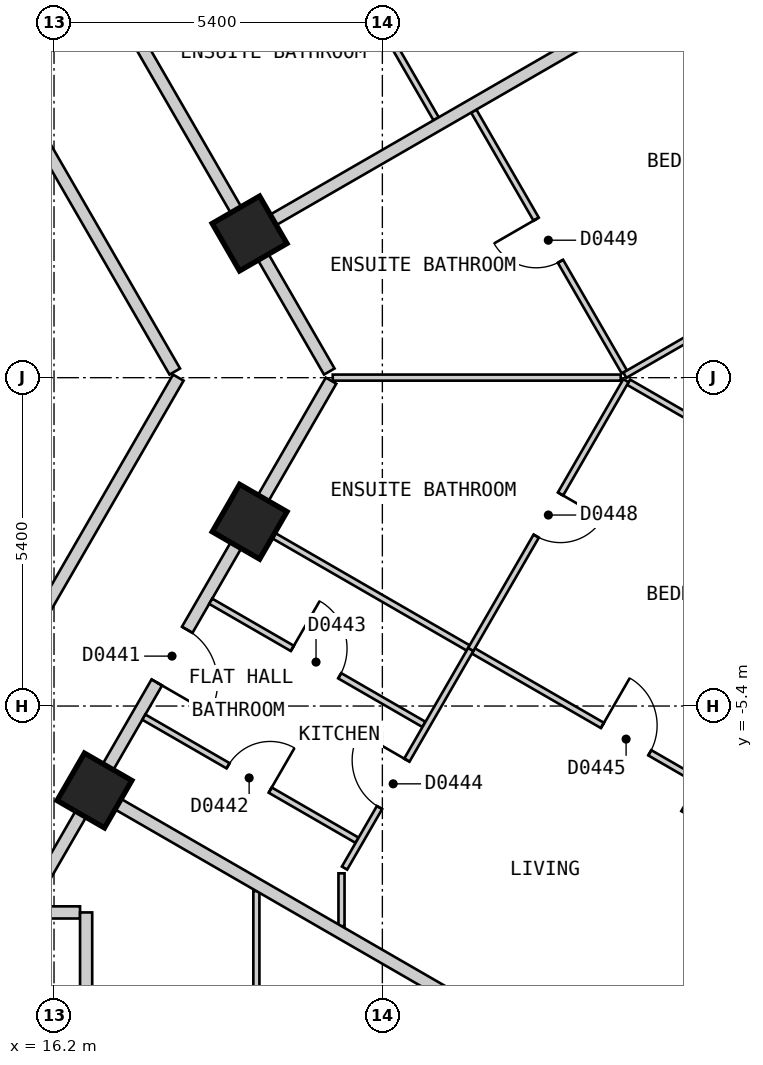
"""IFC4 building model, lengths in metres.
Left out: names, types, materials, properties, quantities, classifications, styles, units other than length and angle.
Written with IfcOpenShell. Run it as: python <this file> out.ifc"""

import sys

from ifc_helpers import new_model, si_unit, direction, frame, frame_2d, origin, origin_2d, place, context, subcontext, project, spatial, polyline, rectangle, outline, extrude, element, fill, save


model = new_model("IFC4")
c1 = context("Model", 3, precision=1e-05, world=origin(), true_north=direction((0.0, 1.0)))
c2 = subcontext(c1, "Body", "Model", "MODEL_VIEW")
j1 = project(units=[si_unit("LENGTHUNIT", "METRE"), si_unit("PLANEANGLEUNIT", "RADIAN")], contexts=[c1])
p1 = place(None, origin())
s1 = spatial("IfcSite", under=j1, at=p1, CompositionType="ELEMENT")
p2 = place(p1, origin())
s2 = spatial("IfcBuilding", under=s1, at=p2, CompositionType="ELEMENT")
p3 = place(p2, frame((0.0, 0.0, 38.4)))
s3 = spatial("IfcBuildingStorey", under=s2, at=p3, CompositionType="ELEMENT", Elevation=38.4)
p4 = place(p3, frame((27.298, -6.919, 0.0), z_axis=(0.0, 0.0, 1.0), x_axis=(0.499984884929, 0.866034130299, 0.0)))
e1 = element("IfcColumn", 1, at=p4, inside=s3, PredefinedType="COLUMN", context=c2, shape_type="SweptSolid", body=[
    extrude(rectangle(XDim=1.1, YDim=1.1, at=origin_2d()), origin(), (0.0, 0.0, 1.0), 3.0),
])
for number, where, z_axis, x_axis in (
    (2, (16.865, -6.789, 0.0), (0.0, 0.0, 1.0), (0.5, 0.866, 0.0)),
    (3, (19.417, -2.369, 0.0), (0.0, 0.0, 1.0), (0.5, 0.866, 0.0)),
    (4, (19.416, 2.371, 0.0), (0.0, 0.0, 1.0), (-0.5, 0.866, 0.0)),
):
    element("IfcColumn", number, at=place(p3, frame(where, z_axis=z_axis, x_axis=x_axis)), inside=s3, PredefinedType="COLUMN", context=c2, shape_type="SweptSolid", body=[
        extrude(rectangle(XDim=0.9, YDim=0.9, at=origin_2d()), origin(), (0.0, 0.0, 1.0), 3.0),
    ])
p5 = place(p3, frame((17.71, -25.825, 0.0), z_axis=(0.0, 0.0, 1.0), x_axis=(0.500001938803, 0.866024284413, 0.0)))
e5 = element("IfcWall", 5, at=p5, inside=s3, PredefinedType="SOLIDWALL", context=c2, shape_type="SweptSolid", body=[
    extrude(outline(polyline([(0.0, -0.15), (27.02, -0.15), (26.94, 0.15), (0.08, 0.15), (0.0, -0.15)])), origin(), (0.0, 0.0, 1.0), 2.7),
])
p6 = place(p5, frame((2.553, 0.0, 0.15)))
e6 = element("IfcOpeningElement", 6, at=p6, cuts=e5, PredefinedType="OPENING", context=c2, shape_type="SweptSolid", body=[
    extrude(rectangle(XDim=1.5, YDim=2.1, at=frame_2d((0.75, 1.05))), frame((0.0, 0.16, 0.0), z_axis=(0.0, -1.0, 0.0), x_axis=(1.0, 0.0, 0.0)), (0.0, 0.0, 1.0), 0.32),
])
p7 = place(p5, frame((7.658, 0.0, 0.15)))
e7 = element("IfcOpeningElement", 7, at=p7, cuts=e5, PredefinedType="OPENING", context=c2, shape_type="SweptSolid", body=[
    extrude(rectangle(XDim=1.5, YDim=2.1, at=frame_2d((0.75, 1.05))), frame((0.0, 0.16, 0.0), z_axis=(0.0, -1.0, 0.0), x_axis=(1.0, 0.0, 0.0)), (0.0, 0.0, 1.0), 0.32),
])
p8 = place(p5, frame((12.761, 0.0, 0.15)))
e8 = element("IfcOpeningElement", 8, at=p8, cuts=e5, PredefinedType="OPENING", context=c2, shape_type="SweptSolid", body=[
    extrude(rectangle(XDim=1.5, YDim=2.1, at=frame_2d((0.75, 1.05))), frame((0.0, 0.16, 0.0), z_axis=(0.0, -1.0, 0.0), x_axis=(1.0, 0.0, 0.0)), (0.0, 0.0, 1.0), 0.32),
])
p9 = place(p5, frame((17.865, 0.0, 0.15)))
e9 = element("IfcOpeningElement", 9, at=p9, cuts=e5, PredefinedType="OPENING", context=c2, shape_type="SweptSolid", body=[
    extrude(rectangle(XDim=1.5, YDim=2.1, at=frame_2d((0.75, 1.05))), frame((0.0, 0.16, 0.0), z_axis=(0.0, -1.0, 0.0), x_axis=(1.0, 0.0, 0.0)), (0.0, 0.0, 1.0), 0.32),
])
p10 = place(p5, frame((22.969, 0.0, 0.15)))
e10 = element("IfcOpeningElement", 10, at=p10, cuts=e5, PredefinedType="OPENING", context=c2, shape_type="SweptSolid", body=[
    extrude(rectangle(XDim=1.5, YDim=2.1, at=frame_2d((0.75, 1.05))), frame((0.0, 0.16, 0.0), z_axis=(0.0, -1.0, 0.0), x_axis=(1.0, 0.0, 0.0)), (0.0, 0.0, 1.0), 0.32),
])
p11 = place(p3, frame((31.22, 2.425, 0.0), z_axis=(0.0, 0.0, 1.0), x_axis=(-0.500001938803, 0.866024284413, 0.0)))
e11 = element("IfcWall", 11, at=p11, inside=s3, PredefinedType="SOLIDWALL", context=c2, shape_type="SweptSolid", body=[
    extrude(outline(polyline([(0.0, -0.15), (27.02, -0.15), (26.94, 0.15), (0.08, 0.15), (0.0, -0.15)])), origin(), (0.0, 0.0, 1.0), 2.7),
])
p12 = place(p11, frame((2.553, 0.0, 0.15)))
e12 = element("IfcOpeningElement", 12, at=p12, cuts=e11, PredefinedType="OPENING", context=c2, shape_type="SweptSolid", body=[
    extrude(rectangle(XDim=1.5, YDim=2.1, at=frame_2d((0.75, 1.05))), frame((0.0, 0.16, 0.0), z_axis=(0.0, -1.0, 0.0), x_axis=(1.0, 0.0, 0.0)), (0.0, 0.0, 1.0), 0.32),
])
p13 = place(p11, frame((7.657, 0.0, 0.15)))
e13 = element("IfcOpeningElement", 13, at=p13, cuts=e11, PredefinedType="OPENING", context=c2, shape_type="SweptSolid", body=[
    extrude(rectangle(XDim=1.5, YDim=2.1, at=frame_2d((0.75, 1.05))), frame((0.0, 0.16, 0.0), z_axis=(0.0, -1.0, 0.0), x_axis=(1.0, 0.0, 0.0)), (0.0, 0.0, 1.0), 0.32),
])
p14 = place(p11, frame((12.761, 0.0, 0.15)))
e14 = element("IfcOpeningElement", 14, at=p14, cuts=e11, PredefinedType="OPENING", context=c2, shape_type="SweptSolid", body=[
    extrude(rectangle(XDim=1.5, YDim=2.1, at=frame_2d((0.75, 1.05))), frame((0.0, 0.16, 0.0), z_axis=(0.0, -1.0, 0.0), x_axis=(1.0, 0.0, 0.0)), (0.0, 0.0, 1.0), 0.32),
])
p15 = place(p11, frame((17.865, 0.0, 0.15)))
e15 = element("IfcOpeningElement", 15, at=p15, cuts=e11, PredefinedType="OPENING", context=c2, shape_type="SweptSolid", body=[
    extrude(rectangle(XDim=1.5, YDim=2.1, at=frame_2d((0.75, 1.05))), frame((0.0, 0.16, 0.0), z_axis=(0.0, -1.0, 0.0), x_axis=(1.0, 0.0, 0.0)), (0.0, 0.0, 1.0), 0.32),
])
p16 = place(p11, frame((22.969, 0.0, 0.15)))
e16 = element("IfcOpeningElement", 16, at=p16, cuts=e11, PredefinedType="OPENING", context=c2, shape_type="SweptSolid", body=[
    extrude(rectangle(XDim=1.5, YDim=2.1, at=frame_2d((0.75, 1.05))), frame((0.0, 0.16, 0.0), z_axis=(0.0, -1.0, 0.0), x_axis=(1.0, 0.0, 0.0)), (0.0, 0.0, 1.0), 0.32),
])
p17 = place(p3, frame((9.18, 15.7, 0.0), z_axis=(0.0, 0.0, 1.0), x_axis=(0.500003652032, -0.866023295272, 0.0)))
e17 = element("IfcWall", 17, at=p17, inside=s3, PredefinedType="PARTITIONING", context=c2, shape_type="SweptSolid", body=[
    extrude(rectangle(XDim=18.012, YDim=0.2, at=frame_2d((9.006, 0.0))), origin(), (0.0, 0.0, 1.0), 2.7),
])
p18 = place(p17, frame((8.556, 0.0, 0.0)))
e18 = element("IfcOpeningElement", 18, at=p18, cuts=e17, PredefinedType="OPENING", context=c2, shape_type="SweptSolid", body=[
    extrude(rectangle(XDim=0.9, YDim=2.1, at=frame_2d((0.45, 1.05))), frame((0.0, 0.11, 0.0), z_axis=(0.0, -1.0, 0.0), x_axis=(1.0, 0.0, 0.0)), (0.0, 0.0, 1.0), 0.22),
])
p19 = place(p3, frame((10.45, 17.9, 0.0), z_axis=(0.0, 0.0, 1.0), x_axis=(0.500034352617, -0.866005569383, 0.0)))
e19 = element("IfcWall", 19, at=p19, inside=s3, PredefinedType="PARTITIONING", context=c2, shape_type="SweptSolid", body=[
    extrude(rectangle(XDim=20.553, YDim=0.2, at=frame_2d((10.276, 0.0))), origin(), (0.0, 0.0, 1.0), 2.7),
])
p20 = place(p19, frame((9.775, 0.0, 0.0)))
e20 = element("IfcOpeningElement", 20, at=p20, cuts=e19, PredefinedType="OPENING", context=c2, shape_type="SweptSolid", body=[
    extrude(rectangle(XDim=1.0, YDim=2.1, at=frame_2d((0.5, 1.05))), frame((0.0, 0.11, 0.0), z_axis=(0.0, -1.0, 0.0), x_axis=(1.0, 0.0, 0.0)), (0.0, 0.0, 1.0), 0.22),
])
p21 = place(p19, frame((0.852, 0.0, 0.0)))
e21 = element("IfcOpeningElement", 21, at=p21, cuts=e19, PredefinedType="OPENING", context=c2, shape_type="SweptSolid", body=[
    extrude(rectangle(XDim=0.8, YDim=2.1, at=frame_2d((0.4, 1.05))), frame((0.0, 0.11, 0.0), z_axis=(0.0, -1.0, 0.0), x_axis=(1.0, 0.0, 0.0)), (0.0, 0.0, 1.0), 0.22),
])
p22 = place(p3, frame((15.822, -8.794, 0.0), z_axis=(0.0, 0.0, 1.0), x_axis=(1.0, 0.0, 0.0)))
e22 = element("IfcWall", 22, at=p22, inside=s3, PredefinedType="PARTITIONING", context=c2, shape_type="SweptSolid", body=[
    extrude(rectangle(XDim=0.806, YDim=0.2, at=frame_2d((0.403, 0.0))), origin(), (0.0, 0.0, 1.0), 2.7),
])
p23 = place(p3, frame((15.6, -4.579, 0.0), z_axis=(0.0, 0.0, 1.0), x_axis=(0.499927597274, 0.866067201483, 0.0)))
e23 = element("IfcWall", 23, at=p23, inside=s3, PredefinedType="PARTITIONING", context=c2, shape_type="SweptSolid", body=[
    extrude(rectangle(XDim=5.288, YDim=0.2, at=frame_2d((2.644, 0.0))), origin(), (0.0, 0.0, 1.0), 2.7),
])
p24 = place(p3, frame((15.707, -8.794, 0.0), z_axis=(0.0, 0.0, 1.0), x_axis=(0.500016151272, 0.866016078642, 0.0)))
e24 = element("IfcWall", 24, at=p24, inside=s3, PredefinedType="PARTITIONING", context=c2, shape_type="SweptSolid", body=[
    extrude(rectangle(XDim=10.098, YDim=0.2, at=frame_2d((5.049, 0.0))), origin(), (0.0, 0.0, 1.0), 2.7),
])
p25 = place(p24, frame((4.367, 0.0, 0.0)))
e25 = element("IfcOpeningElement", 25, at=p25, cuts=e24, PredefinedType="OPENING", context=c2, shape_type="SweptSolid", body=[
    extrude(rectangle(XDim=1.0, YDim=2.1, at=frame_2d((0.5, 1.05))), frame((0.0, 0.11, 0.0), z_axis=(0.0, -1.0, 0.0), x_axis=(1.0, 0.0, 0.0)), (0.0, 0.0, 1.0), 0.22),
])
p26 = place(p3, frame((16.728, -13.624, 0.0), z_axis=(0.0, 0.0, 1.0), x_axis=(0.0, 1.0, 0.0)))
e26 = element("IfcWall", 26, at=p26, inside=s3, PredefinedType="PARTITIONING", context=c2, shape_type="SweptSolid", body=[
    extrude(rectangle(XDim=4.83, YDim=0.2, at=frame_2d((2.415, 0.0))), origin(), (0.0, 0.0, 1.0), 2.7),
])
p27 = place(p3, frame((20.006, 8.548, 0.0), z_axis=(0.0, 0.0, 1.0), x_axis=(0.500055121407, -0.865993577086, 0.0)))
e27 = element("IfcWall", 27, at=p27, inside=s3, PredefinedType="PARTITIONING", context=c2, shape_type="SweptSolid", body=[
    extrude(rectangle(XDim=4.955, YDim=0.1, at=frame_2d((2.478, 0.0))), origin(), (0.0, 0.0, 1.0), 2.7),
])
p28 = place(p27, frame((2.102, 0.0, 0.0)))
e28 = element("IfcOpeningElement", 28, at=p28, cuts=e27, PredefinedType="OPENING", context=c2, shape_type="SweptSolid", body=[
    extrude(rectangle(XDim=0.8, YDim=2.1, at=frame_2d((0.4, 1.05))), frame((0.0, 0.06, 0.0), z_axis=(0.0, -1.0, 0.0), x_axis=(1.0, 0.0, 0.0)), (0.0, 0.0, 1.0), 0.12),
])
p29 = place(p3, frame((23.103, 4.384, 0.0), z_axis=(0.0, 0.0, 1.0), x_axis=(0.500029609304, -0.86600830817, 0.0)))
e29 = element("IfcWall", 29, at=p29, inside=s3, PredefinedType="PARTITIONING", context=c2, shape_type="SweptSolid", body=[
    extrude(rectangle(XDim=4.954, YDim=0.1, at=frame_2d((2.477, 0.0))), origin(), (0.0, 0.0, 1.0), 2.7),
])
p30 = place(p29, frame((2.052, 0.0, 0.0)))
e30 = element("IfcOpeningElement", 30, at=p30, cuts=e29, PredefinedType="OPENING", context=c2, shape_type="SweptSolid", body=[
    extrude(rectangle(XDim=0.8, YDim=2.1, at=frame_2d((0.4, 1.05))), frame((0.0, 0.06, 0.0), z_axis=(0.0, -1.0, 0.0), x_axis=(1.0, 0.0, 0.0)), (0.0, 0.0, 1.0), 0.12),
])
p31 = place(p3, frame((17.677, -5.582, 0.0), z_axis=(0.0, 0.0, 1.0), x_axis=(0.866015917575, -0.500016430238, 0.0)))
e31 = element("IfcWall", 31, at=p31, inside=s3, PredefinedType="PARTITIONING", context=c2, shape_type="SweptSolid", body=[
    extrude(rectangle(XDim=4.05, YDim=0.1, at=frame_2d((2.025, 0.0))), origin(), (0.0, 0.0, 1.0), 2.7),
])
p32 = place(p31, frame((1.6, 0.0, 0.0)))
e32 = element("IfcOpeningElement", 32, at=p32, cuts=e31, PredefinedType="OPENING", context=c2, shape_type="SweptSolid", body=[
    extrude(rectangle(XDim=0.8, YDim=2.1, at=frame_2d((0.4, 1.05))), frame((0.0, 0.06, 0.0), z_axis=(0.0, -1.0, 0.0), x_axis=(1.0, 0.0, 0.0)), (0.0, 0.0, 1.0), 0.12),
])
p33 = place(p3, frame((18.777, -3.677, 0.0), z_axis=(0.0, 0.0, 1.0), x_axis=(0.866000843773, -0.500042536776, 0.0)))
e33 = element("IfcWall", 33, at=p33, inside=s3, PredefinedType="PARTITIONING", context=c2, shape_type="SweptSolid", body=[
    extrude(rectangle(XDim=4.05, YDim=0.1, at=frame_2d((2.025, 0.0))), origin(), (0.0, 0.0, 1.0), 2.7),
])
p34 = place(p33, frame((1.55, 0.0, 0.0)))
e34 = element("IfcOpeningElement", 34, at=p34, cuts=e33, PredefinedType="OPENING", context=c2, shape_type="SweptSolid", body=[
    extrude(rectangle(XDim=0.9, YDim=2.1, at=frame_2d((0.45, 1.05))), frame((0.0, 0.06, 0.0), z_axis=(0.0, -1.0, 0.0), x_axis=(1.0, 0.0, 0.0)), (0.0, 0.0, 1.0), 0.12),
])
p35 = place(p3, frame((19.503, -2.419, 0.0), z_axis=(0.0, 0.0, 1.0), x_axis=(0.866047370643, -0.499961950354, 0.0)))
e35 = element("IfcWall", 35, at=p35, inside=s3, PredefinedType="PARTITIONING", context=c2, shape_type="SweptSolid", body=[
    extrude(rectangle(XDim=10.001, YDim=0.1, at=frame_2d((5.0, 0.0))), origin(), (0.0, 0.0, 1.0), 2.7),
])
p36 = place(p35, frame((6.6, 0.0, 0.0)))
e36 = element("IfcOpeningElement", 36, at=p36, cuts=e35, PredefinedType="OPENING", context=c2, shape_type="SweptSolid", body=[
    extrude(rectangle(XDim=0.9, YDim=2.1, at=frame_2d((0.45, 1.05))), frame((0.0, 0.06, 0.0), z_axis=(0.0, -1.0, 0.0), x_axis=(1.0, 0.0, 0.0)), (0.0, 0.0, 1.0), 0.12),
])
p37 = place(p3, frame((25.649, -0.074, 0.0), z_axis=(0.0, 0.0, 1.0), x_axis=(0.866059819573, -0.499940385368, 0.0)))
e37 = element("IfcWall", 37, at=p37, inside=s3, PredefinedType="PARTITIONING", context=c2, shape_type="SweptSolid", body=[
    extrude(rectangle(XDim=5.851, YDim=0.1, at=frame_2d((2.925, 0.0))), origin(), (0.0, 0.0, 1.0), 2.7),
])
p38 = place(p37, frame((2.45, 0.0, 0.0)))
e38 = element("IfcOpeningElement", 38, at=p38, cuts=e37, PredefinedType="OPENING", context=c2, shape_type="SweptSolid", body=[
    extrude(rectangle(XDim=0.9, YDim=2.1, at=frame_2d((0.45, 1.05))), frame((0.0, 0.06, 0.0), z_axis=(0.0, -1.0, 0.0), x_axis=(1.0, 0.0, 0.0)), (0.0, 0.0, 1.0), 0.12),
])
p39 = place(p3, frame((20.784, 0.001, 0.0), z_axis=(0.0, 0.0, 1.0), x_axis=(1.0, 0.0, 0.0)))
e39 = element("IfcWall", 39, at=p39, inside=s3, PredefinedType="PARTITIONING", context=c2, shape_type="SweptSolid", body=[
    extrude(rectangle(XDim=4.736, YDim=0.1, at=frame_2d((2.368, 0.0))), origin(), (0.0, 0.0, 1.0), 2.7),
])
p40 = place(p3, frame((20.978, -8.065, 0.0), z_axis=(0.0, 0.0, 1.0), x_axis=(0.499965068118, 0.866045570776, 0.0)))
e40 = element("IfcWall", 40, at=p40, inside=s3, PredefinedType="PARTITIONING", context=c2, shape_type="SweptSolid", body=[
    extrude(rectangle(XDim=4.152, YDim=0.1, at=frame_2d((2.076, 0.0))), origin(), (0.0, 0.0, 1.0), 2.7),
])
p41 = place(p40, frame((1.15, 0.0, 0.0)))
e41 = element("IfcOpeningElement", 41, at=p41, cuts=e40, PredefinedType="OPENING", context=c2, shape_type="SweptSolid", body=[
    extrude(rectangle(XDim=0.9, YDim=2.1, at=frame_2d((0.45, 1.05))), frame((0.0, 0.06, 0.0), z_axis=(0.0, -1.0, 0.0), x_axis=(1.0, 0.0, 0.0)), (0.0, 0.0, 1.0), 0.12),
])
p42 = place(p3, frame((19.528, -16.424, 0.0), z_axis=(0.0, 0.0, 1.0), x_axis=(0.0, 1.0, 0.0)))
e42 = element("IfcWall", 42, at=p42, inside=s3, PredefinedType="PARTITIONING", context=c2, shape_type="SweptSolid", body=[
    extrude(rectangle(XDim=7.982, YDim=0.1, at=frame_2d((3.991, 0.0))), origin(), (0.0, 0.0, 1.0), 2.7),
])
p43 = place(p42, frame((4.75, 0.0, 0.0)))
e43 = element("IfcOpeningElement", 43, at=p43, cuts=e42, PredefinedType="OPENING", context=c2, shape_type="SweptSolid", body=[
    extrude(rectangle(XDim=0.8, YDim=2.1, at=frame_2d((0.4, 1.05))), frame((0.0, 0.06, 0.0), z_axis=(0.0, -1.0, 0.0), x_axis=(1.0, 0.0, 0.0)), (0.0, 0.0, 1.0), 0.12),
])
p44 = place(p3, frame((20.928, -9.02, 0.0), z_axis=(0.0, 0.0, 1.0), x_axis=(0.0, 1.0, 0.0)))
e44 = element("IfcWall", 44, at=p44, inside=s3, PredefinedType="PARTITIONING", context=c2, shape_type="SweptSolid", body=[
    extrude(rectangle(XDim=0.869, YDim=0.1, at=frame_2d((0.435, 0.0))), origin(), (0.0, 0.0, 1.0), 2.7),
])
p45 = place(p3, frame((25.588, 0.041, 0.0), z_axis=(0.0, 0.0, 1.0), x_axis=(0.866113484451, 0.499847408768, 0.0)))
e45 = element("IfcWall", 45, at=p45, inside=s3, PredefinedType="PARTITIONING", context=c2, shape_type="SweptSolid", body=[
    extrude(rectangle(XDim=5.92, YDim=0.1, at=frame_2d((2.96, 0.0))), origin(), (0.0, 0.0, 1.0), 2.7),
])
p46 = place(p45, frame((2.51, 0.0, 0.0)))
e46 = element("IfcOpeningElement", 46, at=p46, cuts=e45, PredefinedType="OPENING", context=c2, shape_type="SweptSolid", body=[
    extrude(rectangle(XDim=0.9, YDim=2.1, at=frame_2d((0.45, 1.05))), frame((0.0, 0.06, 0.0), z_axis=(0.0, -1.0, 0.0), x_axis=(1.0, 0.0, 0.0)), (0.0, 0.0, 1.0), 0.12),
])
p47 = place(p3, frame((16.951, -6.839, 0.0), z_axis=(0.0, 0.0, 1.0), x_axis=(0.866022959057, -0.500004234368, 0.0)))
e47 = element("IfcWall", 47, at=p47, inside=s3, PredefinedType="PARTITIONING", context=c2, shape_type="SweptSolid", body=[
    extrude(rectangle(XDim=10.0, YDim=0.2, at=frame_2d((5.0, 0.0))), origin(), (0.0, 0.0, 1.0), 2.7),
])
p48 = place(p3, frame((19.503, 2.421, 0.0), z_axis=(0.0, 0.0, 1.0), x_axis=(0.866065245018, 0.499930986609, 0.0)))
e48 = element("IfcWall", 48, at=p48, inside=s3, PredefinedType="PARTITIONING", context=c2, shape_type="SweptSolid", body=[
    extrude(rectangle(XDim=10.0, YDim=0.2, at=frame_2d((5.0, 0.0))), origin(), (0.0, 0.0, 1.0), 2.7),
])
p49 = place(p3, frame((23.054, -4.469, 0.0), z_axis=(0.0, 0.0, 1.0), x_axis=(0.500023345639, 0.866011924754, 0.0)))
e49 = element("IfcWall", 49, at=p49, inside=s3, PredefinedType="PARTITIONING", context=c2, shape_type="SweptSolid", body=[
    extrude(rectangle(XDim=5.104, YDim=0.1, at=frame_2d((2.552, 0.0))), origin(), (0.0, 0.0, 1.0), 2.7),
])
p50 = place(p49, frame((2.152, 0.0, 0.0)))
e50 = element("IfcOpeningElement", 50, at=p50, cuts=e49, PredefinedType="OPENING", context=c2, shape_type="SweptSolid", body=[
    extrude(rectangle(XDim=0.8, YDim=2.1, at=frame_2d((0.4, 1.05))), frame((0.0, 0.06, 0.0), z_axis=(0.0, -1.0, 0.0), x_axis=(1.0, 0.0, 0.0)), (0.0, 0.0, 1.0), 0.12),
])
p51 = place(p25, origin())
e51 = element("IfcDoor", 51, at=p51, inside=s3, OperationType="SINGLE_SWING_LEFT", PredefinedType="DOOR", context=c2, shape_type="SweptSolid", body=[
    extrude(rectangle(XDim=1.0, YDim=2.1, at=frame_2d((0.5, 1.05))), frame((0.0, 0.025, 0.0), z_axis=(0.0, -1.0, 0.0), x_axis=(1.0, 0.0, 0.0)), (0.0, 0.0, 1.0), 0.05),
])
fill(e25, e51)
p52 = place(p32, origin())
e52 = element("IfcDoor", 52, at=p52, inside=s3, OperationType="SINGLE_SWING_RIGHT", PredefinedType="DOOR", context=c2, shape_type="SweptSolid", body=[
    extrude(rectangle(XDim=0.8, YDim=2.1, at=frame_2d((0.4, 1.05))), frame((0.0, 0.025, 0.0), z_axis=(0.0, -1.0, 0.0), x_axis=(1.0, 0.0, 0.0)), (0.0, 0.0, 1.0), 0.05),
])
fill(e32, e52)
p53 = place(p34, origin())
e53 = element("IfcDoor", 53, at=p53, inside=s3, OperationType="SINGLE_SWING_LEFT", PredefinedType="DOOR", context=c2, shape_type="SweptSolid", body=[
    extrude(rectangle(XDim=0.9, YDim=2.1, at=frame_2d((0.45, 1.05))), frame((0.0, 0.025, 0.0), z_axis=(0.0, -1.0, 0.0), x_axis=(1.0, 0.0, 0.0)), (0.0, 0.0, 1.0), 0.05),
])
fill(e34, e53)
p54 = place(p41, origin())
e54 = element("IfcDoor", 54, at=p54, inside=s3, OperationType="SINGLE_SWING_RIGHT", PredefinedType="DOOR", context=c2, shape_type="SweptSolid", body=[
    extrude(rectangle(XDim=0.9, YDim=2.1, at=frame_2d((0.45, 1.05))), frame((0.0, 0.025, 0.0), z_axis=(0.0, -1.0, 0.0), x_axis=(1.0, 0.0, 0.0)), (0.0, 0.0, 1.0), 0.05),
])
fill(e41, e54)
p55 = place(p36, origin())
e55 = element("IfcDoor", 55, at=p55, inside=s3, OperationType="SINGLE_SWING_LEFT", PredefinedType="DOOR", context=c2, shape_type="SweptSolid", body=[
    extrude(rectangle(XDim=0.9, YDim=2.1, at=frame_2d((0.45, 1.05))), frame((0.0, 0.025, 0.0), z_axis=(0.0, -1.0, 0.0), x_axis=(1.0, 0.0, 0.0)), (0.0, 0.0, 1.0), 0.05),
])
fill(e36, e55)
p56 = place(p50, origin())
e56 = element("IfcDoor", 56, at=p56, inside=s3, OperationType="SINGLE_SWING_RIGHT", PredefinedType="DOOR", context=c2, shape_type="SweptSolid", body=[
    extrude(rectangle(XDim=0.8, YDim=2.1, at=frame_2d((0.4, 1.05))), frame((0.0, 0.025, 0.0), z_axis=(0.0, -1.0, 0.0), x_axis=(1.0, 0.0, 0.0)), (0.0, 0.0, 1.0), 0.05),
])
fill(e50, e56)
p57 = place(p30, origin())
e57 = element("IfcDoor", 57, at=p57, inside=s3, OperationType="SINGLE_SWING_LEFT", PredefinedType="DOOR", context=c2, shape_type="SweptSolid", body=[
    extrude(rectangle(XDim=0.8, YDim=2.1, at=frame_2d((0.4, 1.05))), frame((0.0, 0.025, 0.0), z_axis=(0.0, -1.0, 0.0), x_axis=(1.0, 0.0, 0.0)), (0.0, 0.0, 1.0), 0.05),
])
fill(e30, e57)
save(model, sys.argv[1])
